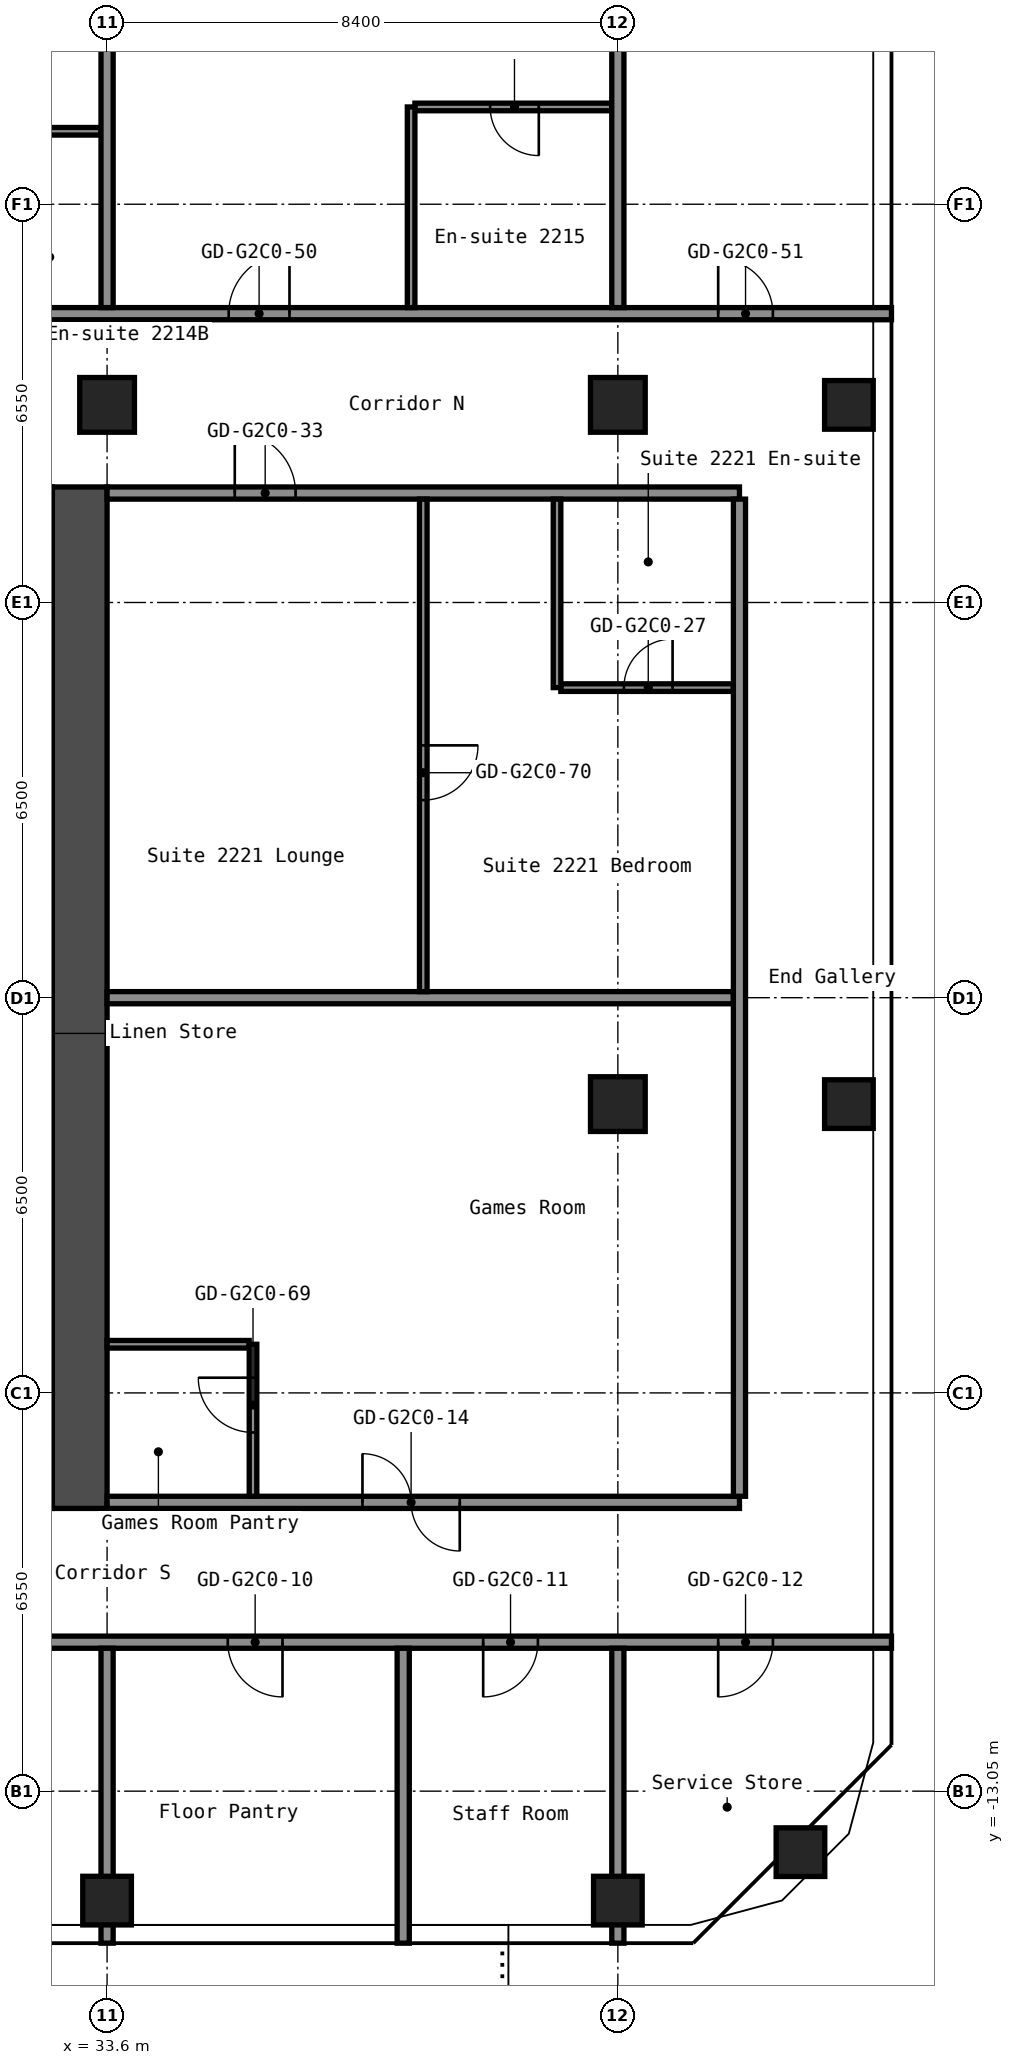
"""IFC4 building model, lengths in metres.
Left out: names, types, materials, properties, quantities, classifications, styles, units other than length and angle.
Written with IfcOpenShell. Run it as: python <this file> out.ifc"""

import sys

from ifc_helpers import new_model, si_unit, direction, frame, frame_2d, origin, origin_2d, place, context, subcontext, project, spatial, rectangle, hollow_rectangle, extrude, element, fill, save


model = new_model("IFC4")
c1 = context("Model", 3, precision=1e-05, world=origin(), true_north=direction((0.0, 1.0)))
c2 = subcontext(c1, "Body", "Model", "MODEL_VIEW")
j1 = project(units=[si_unit("LENGTHUNIT", "METRE"), si_unit("PLANEANGLEUNIT", "RADIAN")], contexts=[c1])
p1 = place(None, origin())
s1 = spatial("IfcSite", under=j1, at=p1, CompositionType="ELEMENT")
p2 = place(p1, origin())
s2 = spatial("IfcBuilding", under=s1, at=p2, CompositionType="ELEMENT")
p3 = place(p2, frame((0.0, 0.0, 81.8)))
s3 = spatial("IfcBuildingStorey", under=s2, at=p3, CompositionType="ELEMENT", Elevation=81.8)
p4 = place(p3, frame((33.6, -14.85, 0.0), z_axis=(0.0, 0.0, 1.0), x_axis=(1.0, 0.0, 0.0)))
e1 = element("IfcColumn", 1, at=p4, inside=s3, PredefinedType="COLUMN", context=c2, shape_type="SweptSolid", body=[
    extrude(hollow_rectangle(XDim=0.8, YDim=0.8, WallThickness=0.032, at=origin_2d()), origin(), (0.0, 0.0, 1.0), 2.8),
])
p5 = place(p3, frame((33.6, 9.75, 0.0), z_axis=(0.0, 0.0, 1.0), x_axis=(1.0, 0.0, 0.0)))
e2 = element("IfcColumn", 2, at=p5, inside=s3, PredefinedType="COLUMN", context=c2, shape_type="SweptSolid", body=[
    extrude(hollow_rectangle(XDim=0.9, YDim=0.9, WallThickness=0.036, at=origin_2d()), origin(), (0.0, 0.0, 1.0), 2.8),
])
p6 = place(p3, frame((42.0, -14.85, 0.0), z_axis=(0.0, 0.0, 1.0), x_axis=(1.0, 0.0, 0.0)))
e3 = element("IfcColumn", 3, at=p6, inside=s3, PredefinedType="COLUMN", context=c2, shape_type="SweptSolid", body=[
    extrude(hollow_rectangle(XDim=0.8, YDim=0.8, WallThickness=0.032, at=origin_2d()), origin(), (0.0, 0.0, 1.0), 2.8),
])
for number, where, z_axis, x_axis in (
    (4, (42.0, -1.75, 0.0), (0.0, 0.0, 1.0), (1.0, 0.0, 0.0)),
    (5, (42.0, 9.75, 0.0), (0.0, 0.0, 1.0), (1.0, 0.0, 0.0)),
):
    element("IfcColumn", number, at=place(p3, frame(where, z_axis=z_axis, x_axis=x_axis)), inside=s3, PredefinedType="COLUMN", context=c2, shape_type="SweptSolid", body=[
        extrude(hollow_rectangle(XDim=0.9, YDim=0.9, WallThickness=0.036, at=origin_2d()), origin(), (0.0, 0.0, 1.0), 2.8),
    ])
for number, where, z_axis, x_axis in (
    (6, (45.003, -14.053, 0.0), (0.0, 0.0, 1.0), (1.0, 0.0, 0.0)),
    (7, (45.8, -1.75, 0.0), (0.0, 0.0, 1.0), (1.0, 0.0, 0.0)),
    (8, (45.8, 9.75, 0.0), (0.0, 0.0, 1.0), (1.0, 0.0, 0.0)),
):
    element("IfcColumn", number, at=place(p3, frame(where, z_axis=z_axis, x_axis=x_axis)), inside=s3, PredefinedType="COLUMN", context=c2, shape_type="SweptSolid", body=[
        extrude(hollow_rectangle(XDim=0.8, YDim=0.8, WallThickness=0.032, at=origin_2d()), origin(), (0.0, 0.0, 1.0), 2.8),
    ])
p7 = place(p3, frame((33.15, -8.4, 0.0), z_axis=(0.0, 0.0, 1.0), x_axis=(0.0, 1.0, 0.0)))
e9 = element("IfcWall", 9, at=p7, inside=s3, PredefinedType="SHEAR", context=c2, shape_type="SweptSolid", body=[
    extrude(rectangle(XDim=16.8, YDim=0.9, at=frame_2d((8.4, 0.0))), origin(), (0.0, 0.0, 1.0), 2.8),
])
p8 = place(p3, frame((16.8, -10.6, 0.0), z_axis=(0.0, 0.0, 1.0), x_axis=(1.0, 0.0, 0.0)))
e10 = element("IfcWall", 10, at=p8, inside=s3, PredefinedType="PARTITIONING", context=c2, shape_type="SweptSolid", body=[
    extrude(rectangle(XDim=29.7, YDim=0.2, at=frame_2d((14.85, 0.0))), origin(), (0.0, 0.0, 1.0), 2.8),
])
p9 = place(p8, frame((1.315, 0.0, 0.0)))
e11 = element("IfcOpeningElement", 11, at=p9, cuts=e10, PredefinedType="OPENING", context=c2, shape_type="SweptSolid", body=[
    extrude(rectangle(XDim=0.9, YDim=2.1, at=frame_2d((0.45, 1.05))), frame((0.0, 0.11, 0.0), z_axis=(0.0, -1.0, 0.0), x_axis=(1.0, 0.0, 0.0)), (0.0, 0.0, 1.0), 0.22),
])
p10 = place(p8, frame((5.515, 0.0, 0.0)))
e12 = element("IfcOpeningElement", 12, at=p10, cuts=e10, PredefinedType="OPENING", context=c2, shape_type="SweptSolid", body=[
    extrude(rectangle(XDim=0.9, YDim=2.1, at=frame_2d((0.45, 1.05))), frame((0.0, 0.11, 0.0), z_axis=(0.0, -1.0, 0.0), x_axis=(1.0, 0.0, 0.0)), (0.0, 0.0, 1.0), 0.22),
])
p11 = place(p8, frame((12.1, 0.0, 0.0)))
e13 = element("IfcOpeningElement", 13, at=p11, cuts=e10, PredefinedType="OPENING", context=c2, shape_type="SweptSolid", body=[
    extrude(rectangle(XDim=1.0, YDim=2.1, at=frame_2d((0.5, 1.05))), frame((0.0, 0.11, 0.0), z_axis=(0.0, -1.0, 0.0), x_axis=(1.0, 0.0, 0.0)), (0.0, 0.0, 1.0), 0.22),
])
p12 = place(p8, frame((18.785, 0.0, 0.0)))
e14 = element("IfcOpeningElement", 14, at=p12, cuts=e10, PredefinedType="OPENING", context=c2, shape_type="SweptSolid", body=[
    extrude(rectangle(XDim=0.9, YDim=2.1, at=frame_2d((0.45, 1.05))), frame((0.0, 0.11, 0.0), z_axis=(0.0, -1.0, 0.0), x_axis=(1.0, 0.0, 0.0)), (0.0, 0.0, 1.0), 0.22),
])
p13 = place(p8, frame((22.985, 0.0, 0.0)))
e15 = element("IfcOpeningElement", 15, at=p13, cuts=e10, PredefinedType="OPENING", context=c2, shape_type="SweptSolid", body=[
    extrude(rectangle(XDim=0.9, YDim=2.1, at=frame_2d((0.45, 1.05))), frame((0.0, 0.11, 0.0), z_axis=(0.0, -1.0, 0.0), x_axis=(1.0, 0.0, 0.0)), (0.0, 0.0, 1.0), 0.22),
])
p14 = place(p8, frame((26.85, 0.0, 0.0)))
e16 = element("IfcOpeningElement", 16, at=p14, cuts=e10, PredefinedType="OPENING", context=c2, shape_type="SweptSolid", body=[
    extrude(rectangle(XDim=0.9, YDim=2.1, at=frame_2d((0.45, 1.05))), frame((0.0, 0.11, 0.0), z_axis=(0.0, -1.0, 0.0), x_axis=(1.0, 0.0, 0.0)), (0.0, 0.0, 1.0), 0.22),
])
p15 = place(p3, frame((33.6, -8.3, 0.0), z_axis=(0.0, 0.0, 1.0), x_axis=(1.0, 0.0, 0.0)))
e17 = element("IfcWall", 17, at=p15, inside=s3, PredefinedType="PARTITIONING", context=c2, shape_type="SweptSolid", body=[
    extrude(rectangle(XDim=10.4, YDim=0.2, at=frame_2d((5.2, 0.0))), origin(), (0.0, 0.0, 1.0), 2.8),
])
p16 = place(p15, frame((4.2, 0.0, 0.0)))
e18 = element("IfcOpeningElement", 18, at=p16, cuts=e17, PredefinedType="OPENING", context=c2, shape_type="SweptSolid", body=[
    extrude(rectangle(XDim=1.6, YDim=2.1, at=frame_2d((0.8, 1.05))), frame((0.0, 0.11, 0.0), z_axis=(0.0, -1.0, 0.0), x_axis=(1.0, 0.0, 0.0)), (0.0, 0.0, 1.0), 0.22),
])
p17 = place(p3, frame((33.6, -5.7, 0.0), z_axis=(0.0, 0.0, 1.0), x_axis=(1.0, 0.0, 0.0)))
e19 = element("IfcWall", 19, at=p17, inside=s3, PredefinedType="PARTITIONING", context=c2, shape_type="SweptSolid", body=[
    extrude(rectangle(XDim=2.337, YDim=0.125, at=frame_2d((1.169, 0.0))), origin(), (0.0, 0.0, 1.0), 2.8),
])
p18 = place(p3, frame((33.6, 0.0, 0.0), z_axis=(0.0, 0.0, 1.0), x_axis=(1.0, 0.0, 0.0)))
e20 = element("IfcWall", 20, at=p18, inside=s3, PredefinedType="PARTITIONING", context=c2, shape_type="SweptSolid", body=[
    extrude(rectangle(XDim=10.3, YDim=0.2, at=frame_2d((5.15, 0.0))), origin(), (0.0, 0.0, 1.0), 2.8),
])
p19 = place(p3, frame((41.062, 5.1, 0.0), z_axis=(0.0, 0.0, 1.0), x_axis=(1.0, 0.0, 0.0)))
e21 = element("IfcWall", 21, at=p19, inside=s3, PredefinedType="PARTITIONING", context=c2, shape_type="SweptSolid", body=[
    extrude(rectangle(XDim=2.837, YDim=0.125, at=frame_2d((1.419, 0.0))), origin(), (0.0, 0.0, 1.0), 2.8),
])
p20 = place(p19, frame((1.038, 0.0, 0.0)))
e22 = element("IfcOpeningElement", 22, at=p20, cuts=e21, PredefinedType="OPENING", context=c2, shape_type="SweptSolid", body=[
    extrude(rectangle(XDim=0.8, YDim=2.1, at=frame_2d((0.4, 1.05))), frame((0.0, 0.073, 0.0), z_axis=(0.0, -1.0, 0.0), x_axis=(1.0, 0.0, 0.0)), (0.0, 0.0, 1.0), 0.145),
])
p21 = place(p3, frame((33.6, 8.3, 0.0), z_axis=(0.0, 0.0, 1.0), x_axis=(1.0, 0.0, 0.0)))
e23 = element("IfcWall", 23, at=p21, inside=s3, PredefinedType="PARTITIONING", context=c2, shape_type="SweptSolid", body=[
    extrude(rectangle(XDim=10.4, YDim=0.2, at=frame_2d((5.2, 0.0))), origin(), (0.0, 0.0, 1.0), 2.8),
])
p22 = place(p21, frame((2.1, 0.0, 0.0)))
e24 = element("IfcOpeningElement", 24, at=p22, cuts=e23, PredefinedType="OPENING", context=c2, shape_type="SweptSolid", body=[
    extrude(rectangle(XDim=1.0, YDim=2.1, at=frame_2d((0.5, 1.05))), frame((0.0, 0.11, 0.0), z_axis=(0.0, -1.0, 0.0), x_axis=(1.0, 0.0, 0.0)), (0.0, 0.0, 1.0), 0.22),
])
p23 = place(p3, frame((16.8, 11.25, 0.0), z_axis=(0.0, 0.0, 1.0), x_axis=(1.0, 0.0, 0.0)))
e25 = element("IfcWall", 25, at=p23, inside=s3, PredefinedType="PARTITIONING", context=c2, shape_type="SweptSolid", body=[
    extrude(rectangle(XDim=29.7, YDim=0.2, at=frame_2d((14.85, 0.0))), origin(), (0.0, 0.0, 1.0), 2.8),
])
p24 = place(p23, frame((5.4, 0.0, 0.0)))
e26 = element("IfcOpeningElement", 26, at=p24, cuts=e25, PredefinedType="OPENING", context=c2, shape_type="SweptSolid", body=[
    extrude(rectangle(XDim=1.0, YDim=2.1, at=frame_2d((0.5, 1.05))), frame((0.0, 0.11, 0.0), z_axis=(0.0, -1.0, 0.0), x_axis=(1.0, 0.0, 0.0)), (0.0, 0.0, 1.0), 0.22),
])
p25 = place(p23, frame((11.25, 0.0, 0.0)))
e27 = element("IfcOpeningElement", 27, at=p25, cuts=e25, PredefinedType="OPENING", context=c2, shape_type="SweptSolid", body=[
    extrude(rectangle(XDim=1.0, YDim=2.1, at=frame_2d((0.5, 1.05))), frame((0.0, 0.11, 0.0), z_axis=(0.0, -1.0, 0.0), x_axis=(1.0, 0.0, 0.0)), (0.0, 0.0, 1.0), 0.22),
])
p26 = place(p23, frame((12.95, 0.0, 0.0)))
e28 = element("IfcOpeningElement", 28, at=p26, cuts=e25, PredefinedType="OPENING", context=c2, shape_type="SweptSolid", body=[
    extrude(rectangle(XDim=1.0, YDim=2.1, at=frame_2d((0.5, 1.05))), frame((0.0, 0.11, 0.0), z_axis=(0.0, -1.0, 0.0), x_axis=(1.0, 0.0, 0.0)), (0.0, 0.0, 1.0), 0.22),
])
p27 = place(p23, frame((18.8, 0.0, 0.0)))
e29 = element("IfcOpeningElement", 29, at=p27, cuts=e25, PredefinedType="OPENING", context=c2, shape_type="SweptSolid", body=[
    extrude(rectangle(XDim=1.0, YDim=2.1, at=frame_2d((0.5, 1.05))), frame((0.0, 0.11, 0.0), z_axis=(0.0, -1.0, 0.0), x_axis=(1.0, 0.0, 0.0)), (0.0, 0.0, 1.0), 0.22),
])
p28 = place(p23, frame((26.85, 0.0, 0.0)))
e30 = element("IfcOpeningElement", 30, at=p28, cuts=e25, PredefinedType="OPENING", context=c2, shape_type="SweptSolid", body=[
    extrude(rectangle(XDim=0.9, YDim=2.1, at=frame_2d((0.45, 1.05))), frame((0.0, 0.11, 0.0), z_axis=(0.0, -1.0, 0.0), x_axis=(1.0, 0.0, 0.0)), (0.0, 0.0, 1.0), 0.22),
])
p29 = place(p3, frame((31.163, 14.25, 0.0), z_axis=(0.0, 0.0, 1.0), x_axis=(1.0, 0.0, 0.0)))
e31 = element("IfcWall", 31, at=p29, inside=s3, PredefinedType="PARTITIONING", context=c2, shape_type="SweptSolid", body=[
    extrude(rectangle(XDim=2.337, YDim=0.125, at=frame_2d((1.169, 0.0))), origin(), (0.0, 0.0, 1.0), 2.8),
])
p30 = place(p3, frame((38.663, 14.65, 0.0), z_axis=(0.0, 0.0, 1.0), x_axis=(1.0, 0.0, 0.0)))
e32 = element("IfcWall", 32, at=p30, inside=s3, PredefinedType="PARTITIONING", context=c2, shape_type="SweptSolid", body=[
    extrude(rectangle(XDim=3.237, YDim=0.125, at=frame_2d((1.619, 0.0))), origin(), (0.0, 0.0, 1.0), 2.8),
])
p31 = place(p30, frame((1.238, 0.0, 0.0)))
e33 = element("IfcOpeningElement", 33, at=p31, cuts=e32, PredefinedType="OPENING", context=c2, shape_type="SweptSolid", body=[
    extrude(rectangle(XDim=0.8, YDim=2.1, at=frame_2d((0.4, 1.05))), frame((0.0, 0.073, 0.0), z_axis=(0.0, -1.0, 0.0), x_axis=(1.0, 0.0, 0.0)), (0.0, 0.0, 1.0), 0.145),
])
p32 = place(p3, frame((33.6, -15.55, 0.0), z_axis=(0.0, 0.0, 1.0), x_axis=(0.0, 1.0, 0.0)))
e34 = element("IfcWall", 34, at=p32, inside=s3, PredefinedType="PARTITIONING", context=c2, shape_type="SweptSolid", body=[
    extrude(rectangle(XDim=4.85, YDim=0.2, at=frame_2d((2.425, 0.0))), origin(), (0.0, 0.0, 1.0), 2.8),
])
p33 = place(p3, frame((33.6, 11.35, 0.0), z_axis=(0.0, 0.0, 1.0), x_axis=(0.0, 1.0, 0.0)))
e35 = element("IfcWall", 35, at=p33, inside=s3, PredefinedType="PARTITIONING", context=c2, shape_type="SweptSolid", body=[
    extrude(rectangle(XDim=12.2, YDim=0.2, at=frame_2d((6.1, 0.0))), origin(), (0.0, 0.0, 1.0), 2.8),
])
p34 = place(p3, frame((36.0, -8.2, 0.0), z_axis=(0.0, 0.0, 1.0), x_axis=(0.0, 1.0, 0.0)))
e36 = element("IfcWall", 36, at=p34, inside=s3, PredefinedType="PARTITIONING", context=c2, shape_type="SweptSolid", body=[
    extrude(rectangle(XDim=2.5, YDim=0.125, at=frame_2d((1.25, 0.0))), origin(), (0.0, 0.0, 1.0), 2.8),
])
p35 = place(p34, frame((1.05, 0.0, 0.0)))
e37 = element("IfcOpeningElement", 37, at=p35, cuts=e36, PredefinedType="OPENING", context=c2, shape_type="SweptSolid", body=[
    extrude(rectangle(XDim=0.9, YDim=2.1, at=frame_2d((0.45, 1.05))), frame((0.0, 0.073, 0.0), z_axis=(0.0, -1.0, 0.0), x_axis=(1.0, 0.0, 0.0)), (0.0, 0.0, 1.0), 0.145),
])
p36 = place(p3, frame((38.47, -15.55, 0.0), z_axis=(0.0, 0.0, 1.0), x_axis=(0.0, 1.0, 0.0)))
e38 = element("IfcWall", 38, at=p36, inside=s3, PredefinedType="PARTITIONING", context=c2, shape_type="SweptSolid", body=[
    extrude(rectangle(XDim=4.85, YDim=0.2, at=frame_2d((2.425, 0.0))), origin(), (0.0, 0.0, 1.0), 2.8),
])
p37 = place(p3, frame((38.6, 11.35, 0.0), z_axis=(0.0, 0.0, 1.0), x_axis=(0.0, 1.0, 0.0)))
e39 = element("IfcWall", 39, at=p37, inside=s3, PredefinedType="PARTITIONING", context=c2, shape_type="SweptSolid", body=[
    extrude(rectangle(XDim=3.3, YDim=0.125, at=frame_2d((1.65, 0.0))), origin(), (0.0, 0.0, 1.0), 2.8),
])
p38 = place(p3, frame((38.8, 0.1, 0.0), z_axis=(0.0, 0.0, 1.0), x_axis=(0.0, 1.0, 0.0)))
e40 = element("IfcWall", 40, at=p38, inside=s3, PredefinedType="PARTITIONING", context=c2, shape_type="SweptSolid", body=[
    extrude(rectangle(XDim=8.1, YDim=0.125, at=frame_2d((4.05, 0.0))), origin(), (0.0, 0.0, 1.0), 2.8),
])
p39 = place(p38, frame((3.15, 0.0, 0.0)))
e41 = element("IfcOpeningElement", 41, at=p39, cuts=e40, PredefinedType="OPENING", context=c2, shape_type="SweptSolid", body=[
    extrude(rectangle(XDim=0.9, YDim=2.1, at=frame_2d((0.45, 1.05))), frame((0.0, 0.073, 0.0), z_axis=(0.0, -1.0, 0.0), x_axis=(1.0, 0.0, 0.0)), (0.0, 0.0, 1.0), 0.145),
])
p40 = place(p3, frame((41.0, 5.1, 0.0), z_axis=(0.0, 0.0, 1.0), x_axis=(0.0, 1.0, 0.0)))
e42 = element("IfcWall", 42, at=p40, inside=s3, PredefinedType="PARTITIONING", context=c2, shape_type="SweptSolid", body=[
    extrude(rectangle(XDim=3.1, YDim=0.125, at=frame_2d((1.55, 0.0))), origin(), (0.0, 0.0, 1.0), 2.8),
])
p41 = place(p3, frame((42.0, -15.55, 0.0), z_axis=(0.0, 0.0, 1.0), x_axis=(0.0, 1.0, 0.0)))
e43 = element("IfcWall", 43, at=p41, inside=s3, PredefinedType="PARTITIONING", context=c2, shape_type="SweptSolid", body=[
    extrude(rectangle(XDim=4.85, YDim=0.2, at=frame_2d((2.425, 0.0))), origin(), (0.0, 0.0, 1.0), 2.8),
])
p42 = place(p3, frame((42.0, 11.35, 0.0), z_axis=(0.0, 0.0, 1.0), x_axis=(0.0, 1.0, 0.0)))
e44 = element("IfcWall", 44, at=p42, inside=s3, PredefinedType="PARTITIONING", context=c2, shape_type="SweptSolid", body=[
    extrude(rectangle(XDim=12.2, YDim=0.2, at=frame_2d((6.1, 0.0))), origin(), (0.0, 0.0, 1.0), 2.8),
])
p43 = place(p3, frame((44.0, -8.2, 0.0), z_axis=(0.0, 0.0, 1.0), x_axis=(0.0, 1.0, 0.0)))
e45 = element("IfcWall", 45, at=p43, inside=s3, PredefinedType="PARTITIONING", context=c2, shape_type="SweptSolid", body=[
    extrude(rectangle(XDim=16.4, YDim=0.2, at=frame_2d((8.2, 0.0))), origin(), (0.0, 0.0, 1.0), 2.8),
])
p44 = place(p12, origin())
e46 = element("IfcDoor", 46, at=p44, inside=s3, OperationType="SINGLE_SWING_RIGHT", PredefinedType="DOOR", context=c2, shape_type="SweptSolid", body=[
    extrude(rectangle(XDim=0.9, YDim=2.1, at=frame_2d((0.45, 1.05))), frame((0.0, 0.025, 0.0), z_axis=(0.0, -1.0, 0.0), x_axis=(1.0, 0.0, 0.0)), (0.0, 0.0, 1.0), 0.05),
])
fill(e14, e46)
p45 = place(p13, origin())
e47 = element("IfcDoor", 47, at=p45, inside=s3, OperationType="SINGLE_SWING_LEFT", PredefinedType="DOOR", context=c2, shape_type="SweptSolid", body=[
    extrude(rectangle(XDim=0.9, YDim=2.1, at=frame_2d((0.45, 1.05))), frame((0.0, 0.025, 0.0), z_axis=(0.0, -1.0, 0.0), x_axis=(1.0, 0.0, 0.0)), (0.0, 0.0, 1.0), 0.05),
])
fill(e15, e47)
p46 = place(p14, origin())
e48 = element("IfcDoor", 48, at=p46, inside=s3, OperationType="SINGLE_SWING_LEFT", PredefinedType="DOOR", context=c2, shape_type="SweptSolid", body=[
    extrude(rectangle(XDim=0.9, YDim=2.1, at=frame_2d((0.45, 1.05))), frame((0.0, 0.025, 0.0), z_axis=(0.0, -1.0, 0.0), x_axis=(1.0, 0.0, 0.0)), (0.0, 0.0, 1.0), 0.05),
])
fill(e16, e48)
p47 = place(p16, origin())
e49 = element("IfcDoor", 49, at=p47, inside=s3, OperationType="DOUBLE_DOOR_SINGLE_SWING", PredefinedType="DOOR", context=c2, shape_type="SweptSolid", body=[
    extrude(rectangle(XDim=1.6, YDim=2.1, at=frame_2d((0.8, 1.05))), frame((0.0, 0.025, 0.0), z_axis=(0.0, -1.0, 0.0), x_axis=(1.0, 0.0, 0.0)), (0.0, 0.0, 1.0), 0.05),
])
fill(e18, e49)
p48 = place(p20, origin())
e50 = element("IfcDoor", 50, at=p48, inside=s3, OperationType="SINGLE_SWING_LEFT", PredefinedType="DOOR", context=c2, shape_type="SweptSolid", body=[
    extrude(rectangle(XDim=0.8, YDim=2.1, at=frame_2d((0.4, 1.05))), frame((0.0, 0.025, 0.0), z_axis=(0.0, -1.0, 0.0), x_axis=(1.0, 0.0, 0.0)), (0.0, 0.0, 1.0), 0.05),
])
fill(e22, e50)
p49 = place(p22, origin())
e51 = element("IfcDoor", 51, at=p49, inside=s3, OperationType="SINGLE_SWING_RIGHT", PredefinedType="DOOR", context=c2, shape_type="SweptSolid", body=[
    extrude(rectangle(XDim=1.0, YDim=2.1, at=frame_2d((0.5, 1.05))), frame((0.0, 0.025, 0.0), z_axis=(0.0, -1.0, 0.0), x_axis=(1.0, 0.0, 0.0)), (0.0, 0.0, 1.0), 0.05),
])
fill(e24, e51)
p50 = place(p27, origin())
e52 = element("IfcDoor", 52, at=p50, inside=s3, OperationType="SINGLE_SWING_LEFT", PredefinedType="DOOR", context=c2, shape_type="SweptSolid", body=[
    extrude(rectangle(XDim=1.0, YDim=2.1, at=frame_2d((0.5, 1.05))), frame((0.0, 0.025, 0.0), z_axis=(0.0, -1.0, 0.0), x_axis=(1.0, 0.0, 0.0)), (0.0, 0.0, 1.0), 0.05),
])
fill(e29, e52)
p51 = place(p28, origin())
e53 = element("IfcDoor", 53, at=p51, inside=s3, OperationType="SINGLE_SWING_RIGHT", PredefinedType="DOOR", context=c2, shape_type="SweptSolid", body=[
    extrude(rectangle(XDim=0.9, YDim=2.1, at=frame_2d((0.45, 1.05))), frame((0.0, 0.025, 0.0), z_axis=(0.0, -1.0, 0.0), x_axis=(1.0, 0.0, 0.0)), (0.0, 0.0, 1.0), 0.05),
])
fill(e30, e53)
p52 = place(p31, origin())
e54 = element("IfcDoor", 54, at=p52, inside=s3, OperationType="SINGLE_SWING_RIGHT", PredefinedType="DOOR", context=c2, shape_type="SweptSolid", body=[
    extrude(rectangle(XDim=0.8, YDim=2.1, at=frame_2d((0.4, 1.05))), frame((0.0, 0.025, 0.0), z_axis=(0.0, -1.0, 0.0), x_axis=(1.0, 0.0, 0.0)), (0.0, 0.0, 1.0), 0.05),
])
fill(e33, e54)
p53 = place(p35, origin())
e55 = element("IfcDoor", 55, at=p53, inside=s3, OperationType="SINGLE_SWING_LEFT", PredefinedType="DOOR", context=c2, shape_type="SweptSolid", body=[
    extrude(rectangle(XDim=0.9, YDim=2.1, at=frame_2d((0.45, 1.05))), frame((0.0, 0.025, 0.0), z_axis=(0.0, -1.0, 0.0), x_axis=(1.0, 0.0, 0.0)), (0.0, 0.0, 1.0), 0.05),
])
fill(e37, e55)
p54 = place(p39, origin())
e56 = element("IfcDoor", 56, at=p54, inside=s3, OperationType="SINGLE_SWING_RIGHT", PredefinedType="DOOR", context=c2, shape_type="SweptSolid", body=[
    extrude(rectangle(XDim=0.9, YDim=2.1, at=frame_2d((0.45, 1.05))), frame((0.0, 0.025, 0.0), z_axis=(0.0, -1.0, 0.0), x_axis=(1.0, 0.0, 0.0)), (0.0, 0.0, 1.0), 0.05),
])
fill(e41, e56)
save(model, sys.argv[1])
